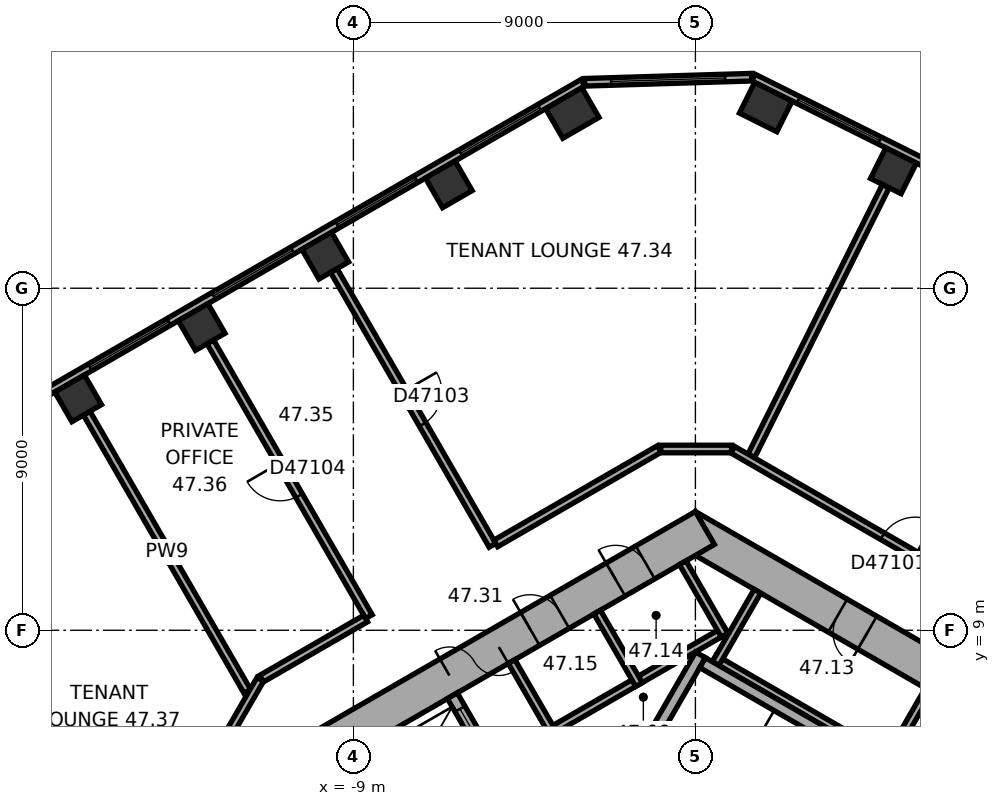
"""IFC4 building model, lengths in metres.
Left out: names, types, materials, properties, quantities, classifications, styles, units other than length and angle.
Written with IfcOpenShell. Run it as: python <this file> out.ifc"""

import sys

from ifc_helpers import new_model, si_unit, direction, frame, frame_2d, origin, origin_2d, place, context, subcontext, project, spatial, rectangle, extrude, element, fill, save


model = new_model("IFC4")
c1 = context("Model", 3, precision=1e-05, world=origin(), true_north=direction((0.0, 1.0)))
c2 = subcontext(c1, "Body", "Model", "MODEL_VIEW")
j1 = project(units=[si_unit("LENGTHUNIT", "METRE"), si_unit("PLANEANGLEUNIT", "RADIAN")], contexts=[c1])
p1 = place(None, origin())
s1 = spatial("IfcSite", under=j1, at=p1, CompositionType="ELEMENT")
p2 = place(p1, origin())
s2 = spatial("IfcBuilding", under=s1, at=p2, CompositionType="ELEMENT")
p3 = place(p2, frame((0.0, 0.0, 191.0)))
s3 = spatial("IfcBuildingStorey", under=s2, at=p3, CompositionType="ELEMENT", Elevation=191.0)
p4 = place(p3, frame((5.211, 21.091, 0.0), z_axis=(0.0, 0.0, 1.0), x_axis=(-0.894934361602, 0.44619781311, 0.0)))
e1 = element("IfcColumn", 1, at=p4, inside=s3, PredefinedType="COLUMN", context=c2, shape_type="SweptSolid", body=[
    extrude(rectangle(XDim=0.9, YDim=0.9, at=origin_2d()), origin(), (0.0, 0.0, 1.0), 3.7),
])
for number, where, z_axis, x_axis in (
    (2, (1.852, 22.766, 0.0), (0.0, 0.0, 1.0), (-0.895, 0.446, 0.0)),
    (3, (-3.238, 22.61, 0.0), (0.0, 0.0, 1.0), (-0.866, -0.5, 0.0)),
):
    element("IfcColumn", number, at=place(p3, frame(where, z_axis=z_axis, x_axis=x_axis)), inside=s3, PredefinedType="COLUMN", context=c2, shape_type="SweptSolid", body=[
        extrude(rectangle(XDim=1.1, YDim=0.9, at=origin_2d()), origin(), (0.0, 0.0, 1.0), 3.7),
    ])
for number, where, z_axis, x_axis in (
    (4, (-6.489, 20.733, 0.0), (0.0, 0.0, 1.0), (-0.866, -0.5, 0.0)),
    (5, (-9.74, 18.856, 0.0), (0.0, 0.0, 1.0), (-0.866, -0.5, 0.0)),
    (6, (-12.991, 16.979, 0.0), (0.0, 0.0, 1.0), (-0.866, -0.5, 0.0)),
    (7, (-16.242, 15.102, 0.0), (0.0, 0.0, 1.0), (-0.866, -0.5, 0.0)),
):
    element("IfcColumn", number, at=place(p3, frame(where, z_axis=z_axis, x_axis=x_axis)), inside=s3, PredefinedType="COLUMN", context=c2, shape_type="SweptSolid", body=[
        extrude(rectangle(XDim=0.9, YDim=0.9, at=origin_2d()), origin(), (0.0, 0.0, 1.0), 3.7),
    ])
p5 = place(p3, frame((10.25, 5.629, 0.0), z_axis=(0.0, 0.0, 1.0), x_axis=(-0.866022616891, 0.50000482701, 0.0)))
e8 = element("IfcWall", 8, at=p5, inside=s3, PredefinedType="SHEAR", context=c2, shape_type="SweptSolid", body=[
    extrude(rectangle(XDim=12.125, YDim=1.0, at=frame_2d((6.062, 0.0))), origin(), (0.0, 0.0, 1.0), 3.7),
])
p6 = place(p5, frame((2.712, 0.0, 0.0)))
e9 = element("IfcOpeningElement", 9, at=p6, cuts=e8, PredefinedType="OPENING", context=c2, shape_type="SweptSolid", body=[
    extrude(rectangle(XDim=0.9, YDim=2.1, at=frame_2d((0.45, 1.05))), frame((0.0, 0.51, 0.0), z_axis=(0.0, -1.0, 0.0), x_axis=(1.0, 0.0, 0.0)), (0.0, 0.0, 1.0), 1.02),
])
p7 = place(p5, frame((6.612, 0.0, 0.0)))
e10 = element("IfcOpeningElement", 10, at=p7, cuts=e8, PredefinedType="OPENING", context=c2, shape_type="SweptSolid", body=[
    extrude(rectangle(XDim=0.9, YDim=2.1, at=frame_2d((0.45, 1.05))), frame((0.0, 0.51, 0.0), z_axis=(0.0, -1.0, 0.0), x_axis=(1.0, 0.0, 0.0)), (0.0, 0.0, 1.0), 1.02),
])
p8 = place(p3, frame((0.25, 11.691, 0.0), z_axis=(0.0, 0.0, 1.0), x_axis=(-0.866022616891, -0.50000482701, 0.0)))
e11 = element("IfcWall", 11, at=p8, inside=s3, PredefinedType="SHEAR", context=c2, shape_type="SweptSolid", body=[
    extrude(rectangle(XDim=12.125, YDim=1.0, at=frame_2d((6.062, 0.0))), origin(), (0.0, 0.0, 1.0), 3.7),
])
p9 = place(p8, frame((6.262, 0.0, 0.0)))
e12 = element("IfcOpeningElement", 12, at=p9, cuts=e11, PredefinedType="OPENING", context=c2, shape_type="SweptSolid", body=[
    extrude(rectangle(XDim=1.5, YDim=2.1, at=frame_2d((0.75, 1.05))), frame((0.0, 0.51, 0.0), z_axis=(0.0, -1.0, 0.0), x_axis=(1.0, 0.0, 0.0)), (0.0, 0.0, 1.0), 1.02),
])
p10 = place(p8, frame((1.812, 0.0, 0.0)))
e13 = element("IfcOpeningElement", 13, at=p10, cuts=e11, PredefinedType="OPENING", context=c2, shape_type="SweptSolid", body=[
    extrude(rectangle(XDim=0.9, YDim=2.1, at=frame_2d((0.45, 1.05))), frame((0.0, 0.51, 0.0), z_axis=(0.0, -1.0, 0.0), x_axis=(1.0, 0.0, 0.0)), (0.0, 0.0, 1.0), 1.02),
])
p11 = place(p8, frame((4.412, 0.0, 0.0)))
e14 = element("IfcOpeningElement", 14, at=p11, cuts=e11, PredefinedType="OPENING", context=c2, shape_type="SweptSolid", body=[
    extrude(rectangle(XDim=0.9, YDim=2.1, at=frame_2d((0.45, 1.05))), frame((0.0, 0.51, 0.0), z_axis=(0.0, -1.0, 0.0), x_axis=(1.0, 0.0, 0.0)), (0.0, 0.0, 1.0), 1.02),
])
p12 = place(p3, frame((19.464, 14.599, 0.0), z_axis=(0.0, 0.0, 1.0), x_axis=(-0.894935755043, 0.446195018289, 0.0)))
e15 = element("IfcWall", 15, at=p12, inside=s3, PredefinedType="STANDARD", context=c2, shape_type="SweptSolid", body=[
    extrude(rectangle(XDim=20.044, YDim=0.2, at=frame_2d((10.022, 0.0))), origin(), (0.0, 0.0, 1.0), 3.7),
])
p13 = place(p12, frame((1.313, 0.0, 0.9)))
e16 = element("IfcOpeningElement", 16, at=p13, cuts=e15, PredefinedType="OPENING", context=c2, shape_type="SweptSolid", body=[
    extrude(rectangle(XDim=2.4, YDim=2.0, at=frame_2d((1.2, 1.0))), frame((0.0, 0.11, 0.0), z_axis=(0.0, -1.0, 0.0), x_axis=(1.0, 0.0, 0.0)), (0.0, 0.0, 1.0), 0.22),
])
p14 = place(p12, frame((5.067, 0.0, 0.9)))
e17 = element("IfcOpeningElement", 17, at=p14, cuts=e15, PredefinedType="OPENING", context=c2, shape_type="SweptSolid", body=[
    extrude(rectangle(XDim=2.4, YDim=2.0, at=frame_2d((1.2, 1.0))), frame((0.0, 0.11, 0.0), z_axis=(0.0, -1.0, 0.0), x_axis=(1.0, 0.0, 0.0)), (0.0, 0.0, 1.0), 0.22),
])
p15 = place(p12, frame((8.821, 0.0, 0.9)))
e18 = element("IfcOpeningElement", 18, at=p15, cuts=e15, PredefinedType="OPENING", context=c2, shape_type="SweptSolid", body=[
    extrude(rectangle(XDim=2.4, YDim=2.0, at=frame_2d((1.2, 1.0))), frame((0.0, 0.11, 0.0), z_axis=(0.0, -1.0, 0.0), x_axis=(1.0, 0.0, 0.0)), (0.0, 0.0, 1.0), 0.22),
])
p16 = place(p12, frame((12.575, 0.0, 0.9)))
e19 = element("IfcOpeningElement", 19, at=p16, cuts=e15, PredefinedType="OPENING", context=c2, shape_type="SweptSolid", body=[
    extrude(rectangle(XDim=2.4, YDim=2.0, at=frame_2d((1.2, 1.0))), frame((0.0, 0.11, 0.0), z_axis=(0.0, -1.0, 0.0), x_axis=(1.0, 0.0, 0.0)), (0.0, 0.0, 1.0), 0.22),
])
p17 = place(p12, frame((16.329, 0.0, 0.9)))
e20 = element("IfcOpeningElement", 20, at=p17, cuts=e15, PredefinedType="OPENING", context=c2, shape_type="SweptSolid", body=[
    extrude(rectangle(XDim=2.4, YDim=2.0, at=frame_2d((1.2, 1.0))), frame((0.0, 0.11, 0.0), z_axis=(0.0, -1.0, 0.0), x_axis=(1.0, 0.0, 0.0)), (0.0, 0.0, 1.0), 0.22),
])
p18 = place(p3, frame((1.479, 23.553, 0.0), z_axis=(0.0, 0.0, 1.0), x_axis=(-0.999534786117, -0.03049936625, 0.0)))
e21 = element("IfcWall", 21, at=p18, inside=s3, PredefinedType="STANDARD", context=c2, shape_type="SweptSolid", body=[
    extrude(rectangle(XDim=4.395, YDim=0.2, at=frame_2d((2.197, 0.0))), origin(), (0.0, 0.0, 1.0), 3.7),
])
p19 = place(p18, frame((0.698, 0.0, 0.9)))
e22 = element("IfcOpeningElement", 22, at=p19, cuts=e21, PredefinedType="OPENING", context=c2, shape_type="SweptSolid", body=[
    extrude(rectangle(XDim=3.0, YDim=2.0, at=frame_2d((1.5, 1.0))), frame((0.0, 0.11, 0.0), z_axis=(0.0, -1.0, 0.0), x_axis=(1.0, 0.0, 0.0)), (0.0, 0.0, 1.0), 0.22),
])
p20 = place(p3, frame((-2.961, 23.405, 0.0), z_axis=(0.0, 0.0, 1.0), x_axis=(-0.866023315909, -0.500003616288, 0.0)))
e23 = element("IfcWall", 23, at=p20, inside=s3, PredefinedType="STANDARD", context=c2, shape_type="SweptSolid", body=[
    extrude(rectangle(XDim=20.044, YDim=0.2, at=frame_2d((10.022, 0.0))), origin(), (0.0, 0.0, 1.0), 3.7),
])
p21 = place(p20, frame((1.314, 0.0, 0.9)))
e24 = element("IfcOpeningElement", 24, at=p21, cuts=e23, PredefinedType="OPENING", context=c2, shape_type="SweptSolid", body=[
    extrude(rectangle(XDim=2.4, YDim=2.0, at=frame_2d((1.2, 1.0))), frame((0.0, 0.11, 0.0), z_axis=(0.0, -1.0, 0.0), x_axis=(1.0, 0.0, 0.0)), (0.0, 0.0, 1.0), 0.22),
])
p22 = place(p20, frame((5.069, 0.0, 0.9)))
e25 = element("IfcOpeningElement", 25, at=p22, cuts=e23, PredefinedType="OPENING", context=c2, shape_type="SweptSolid", body=[
    extrude(rectangle(XDim=2.4, YDim=2.0, at=frame_2d((1.2, 1.0))), frame((0.0, 0.11, 0.0), z_axis=(0.0, -1.0, 0.0), x_axis=(1.0, 0.0, 0.0)), (0.0, 0.0, 1.0), 0.22),
])
p23 = place(p20, frame((8.823, 0.0, 0.9)))
e26 = element("IfcOpeningElement", 26, at=p23, cuts=e23, PredefinedType="OPENING", context=c2, shape_type="SweptSolid", body=[
    extrude(rectangle(XDim=2.4, YDim=2.0, at=frame_2d((1.2, 1.0))), frame((0.0, 0.11, 0.0), z_axis=(0.0, -1.0, 0.0), x_axis=(1.0, 0.0, 0.0)), (0.0, 0.0, 1.0), 0.22),
])
p24 = place(p20, frame((12.577, 0.0, 0.9)))
e27 = element("IfcOpeningElement", 27, at=p24, cuts=e23, PredefinedType="OPENING", context=c2, shape_type="SweptSolid", body=[
    extrude(rectangle(XDim=2.4, YDim=2.0, at=frame_2d((1.2, 1.0))), frame((0.0, 0.11, 0.0), z_axis=(0.0, -1.0, 0.0), x_axis=(1.0, 0.0, 0.0)), (0.0, 0.0, 1.0), 0.22),
])
p25 = place(p20, frame((16.331, 0.0, 0.9)))
e28 = element("IfcOpeningElement", 28, at=p25, cuts=e23, PredefinedType="OPENING", context=c2, shape_type="SweptSolid", body=[
    extrude(rectangle(XDim=2.4, YDim=2.0, at=frame_2d((1.2, 1.0))), frame((0.0, 0.11, 0.0), z_axis=(0.0, -1.0, 0.0), x_axis=(1.0, 0.0, 0.0)), (0.0, 0.0, 1.0), 0.22),
])
p26 = place(p3, frame((7.424, 4.259, 0.0), z_axis=(0.0, 0.0, 1.0), x_axis=(-0.866026010844, 0.49999894854, 0.0)))
e29 = element("IfcWall", 29, at=p26, inside=s3, PredefinedType="PARTITIONING", context=c2, shape_type="SweptSolid", body=[
    extrude(rectangle(XDim=8.0, YDim=0.2, at=frame_2d((4.0, 0.0))), origin(), (0.0, 0.0, 1.0), 3.42),
])
for number, where, z_axis, x_axis in (
    (30, (5.036, 5.522, 0.0), (0.0, 0.0, 1.0), (0.5, 0.866, 0.0)),
    (31, (0.532, 8.122, 0.0), (0.0, 0.0, 1.0), (0.5, 0.866, 0.0)),
):
    element("IfcWall", number, at=place(p3, frame(where, z_axis=z_axis, x_axis=x_axis)), inside=s3, PredefinedType="PARTITIONING", context=c2, shape_type="SweptSolid", body=[
        extrude(rectangle(XDim=2.2, YDim=0.2, at=frame_2d((1.1, 0.0))), origin(), (0.0, 0.0, 1.0), 3.42),
    ])
p27 = place(p3, frame((0.803, 9.009, 0.0), z_axis=(0.0, 0.0, 1.0), x_axis=(-0.866028230842, -0.499995103361, 0.0)))
e32 = element("IfcWall", 32, at=p27, inside=s3, PredefinedType="PARTITIONING", context=c2, shape_type="SweptSolid", body=[
    extrude(rectangle(XDim=5.4, YDim=0.2, at=frame_2d((2.7, 0.0))), origin(), (0.0, 0.0, 1.0), 3.42),
])
p28 = place(p3, frame((0.767, 8.872, 0.0), z_axis=(0.0, 0.0, 1.0), x_axis=(-0.499994660107, 0.866028486751, 0.0)))
e33 = element("IfcWall", 33, at=p28, inside=s3, PredefinedType="PARTITIONING", context=c2, shape_type="SweptSolid", body=[
    extrude(rectangle(XDim=2.2, YDim=0.2, at=frame_2d((1.1, 0.0))), origin(), (0.0, 0.0, 1.0), 3.42),
])
for number, where, z_axis, x_axis in (
    (34, (-1.485, 7.572, 0.0), (0.0, 0.0, 1.0), (-0.5, 0.866, 0.0)),
    (35, (-3.737, 6.272, 0.0), (0.0, 0.0, 1.0), (-0.5, 0.866, 0.0)),
):
    element("IfcWall", number, at=place(p3, frame(where, z_axis=z_axis, x_axis=x_axis)), inside=s3, PredefinedType="PARTITIONING", context=c2, shape_type="SweptSolid", body=[
        extrude(rectangle(XDim=2.2, YDim=0.2, at=frame_2d((1.1, 0.0))), origin(), (0.0, 0.0, 1.0), 3.42),
    ])
p29 = place(p3, frame((-2.216, 4.282, 0.0), z_axis=(0.0, 0.0, 1.0), x_axis=(0.499977259774, 0.866038532462, 0.0)))
e36 = element("IfcWall", 36, at=p29, inside=s3, PredefinedType="SHEAR", context=c2, shape_type="SweptSolid", body=[
    extrude(rectangle(XDim=4.7, YDim=0.3, at=frame_2d((2.35, 0.0))), origin(), (0.0, 0.0, 1.0), 3.42),
])
p30 = place(p3, frame((6.303, 4.617, 0.0), z_axis=(0.0, 0.0, 1.0), x_axis=(-0.866027801685, 0.499995846692, 0.0)))
e37 = element("IfcWall", 37, at=p30, inside=s3, PredefinedType="SHEAR", context=c2, shape_type="SweptSolid", body=[
    extrude(rectangle(XDim=7.06, YDim=0.3, at=frame_2d((3.53, 0.0))), origin(), (0.0, 0.0, 1.0), 3.42),
])
p31 = place(p3, frame((-5.295, 5.372, 0.0), z_axis=(0.0, 0.0, 1.0), x_axis=(-0.500077893725, 0.86598042715, 0.0)))
e38 = element("IfcWall", 38, at=p31, inside=s3, PredefinedType="SHEAR", context=c2, shape_type="SweptSolid", body=[
    extrude(rectangle(XDim=2.2, YDim=0.3, at=frame_2d((1.1, 0.0))), origin(), (0.0, 0.0, 1.0), 3.42),
])
p32 = place(p31, frame((0.7, 0.0, 0.0)))
e39 = element("IfcOpeningElement", 39, at=p32, cuts=e38, PredefinedType="OPENING", context=c2, shape_type="SweptSolid", body=[
    extrude(rectangle(XDim=1.1, YDim=2.1, at=frame_2d((0.55, 1.05))), frame((0.0, 0.16, 0.0), z_axis=(0.0, -1.0, 0.0), x_axis=(1.0, 0.0, 0.0)), (0.0, 0.0, 1.0), 0.32),
])
p33 = place(p3, frame((-16.018, 14.712, 0.0), z_axis=(0.0, 0.0, 1.0), x_axis=(0.500000843414, -0.866024916838, 0.0)))
e40 = element("IfcWall", 40, at=p33, inside=s3, PredefinedType="PARTITIONING", context=c2, shape_type="SweptSolid", body=[
    extrude(rectangle(XDim=8.452, YDim=0.2, at=frame_2d((4.226, 0.0))), origin(), (0.0, 0.0, 1.0), 3.42),
])
p34 = place(p3, frame((-12.766, 16.589, 0.0), z_axis=(0.0, 0.0, 1.0), x_axis=(0.500010139422, -0.866019549707, 0.0)))
e41 = element("IfcWall", 41, at=p34, inside=s3, PredefinedType="PARTITIONING", context=c2, shape_type="SweptSolid", body=[
    extrude(rectangle(XDim=8.35, YDim=0.2, at=frame_2d((4.175, 0.0))), origin(), (0.0, 0.0, 1.0), 3.42),
])
p35 = place(p34, frame((3.675, 0.0, 0.0)))
e42 = element("IfcOpeningElement", 42, at=p35, cuts=e41, PredefinedType="OPENING", context=c2, shape_type="SweptSolid", body=[
    extrude(rectangle(XDim=1.0, YDim=2.1, at=frame_2d((0.5, 1.05))), frame((0.0, 0.11, 0.0), z_axis=(0.0, -1.0, 0.0), x_axis=(1.0, 0.0, 0.0)), (0.0, 0.0, 1.0), 0.22),
])
p36 = place(p3, frame((-11.45, 7.708, 0.0), z_axis=(0.0, 0.0, 1.0), x_axis=(-0.499964847546, -0.866045698112, 0.0)))
e43 = element("IfcWall", 43, at=p36, inside=s3, PredefinedType="PARTITIONING", context=c2, shape_type="SweptSolid", body=[
    extrude(rectangle(XDim=1.86, YDim=0.2, at=frame_2d((0.93, 0.0))), origin(), (0.0, 0.0, 1.0), 3.42),
])
p37 = place(p3, frame((-9.515, 18.466, 0.0), z_axis=(0.0, 0.0, 1.0), x_axis=(0.500010139422, -0.866019549707, 0.0)))
e44 = element("IfcWall", 44, at=p37, inside=s3, PredefinedType="PARTITIONING", context=c2, shape_type="SweptSolid", body=[
    extrude(rectangle(XDim=8.35, YDim=0.2, at=frame_2d((4.175, 0.0))), origin(), (0.0, 0.0, 1.0), 2.87),
])
p38 = place(p37, frame((3.675, 0.0, 0.0)))
e45 = element("IfcOpeningElement", 45, at=p38, cuts=e44, PredefinedType="OPENING", context=c2, shape_type="SweptSolid", body=[
    extrude(rectangle(XDim=1.0, YDim=2.1, at=frame_2d((0.5, 1.05))), frame((0.0, 0.11, 0.0), z_axis=(0.0, -1.0, 0.0), x_axis=(1.0, 0.0, 0.0)), (0.0, 0.0, 1.0), 0.22),
])
p39 = place(p3, frame((-8.678, 9.308, 0.0), z_axis=(0.0, 0.0, 1.0), x_axis=(-0.866000359435, -0.500043375578, 0.0)))
e46 = element("IfcWall", 46, at=p39, inside=s3, PredefinedType="PARTITIONING", context=c2, shape_type="SweptSolid", body=[
    extrude(rectangle(XDim=3.161, YDim=0.2, at=frame_2d((1.581, 0.0))), origin(), (0.0, 0.0, 1.0), 3.42),
])
p40 = place(p3, frame((-0.95, 13.77, 0.0), z_axis=(0.0, 0.0, 1.0), x_axis=(-0.866036689987, -0.499980451214, 0.0)))
e47 = element("IfcWall", 47, at=p40, inside=s3, PredefinedType="PARTITIONING", context=c2, shape_type="SweptSolid", body=[
    extrude(rectangle(XDim=4.969, YDim=0.2, at=frame_2d((2.485, 0.0))), origin(), (0.0, 0.0, 1.0), 3.42),
])
p41 = place(p3, frame((0.95, 13.77, 0.0), z_axis=(0.0, 0.0, 1.0), x_axis=(-1.0, 0.0, 0.0)))
e48 = element("IfcWall", 48, at=p41, inside=s3, PredefinedType="PARTITIONING", context=c2, shape_type="SweptSolid", body=[
    extrude(rectangle(XDim=1.86, YDim=0.2, at=frame_2d((0.93, 0.0))), origin(), (0.0, 0.0, 1.0), 3.42),
])
p42 = place(p3, frame((5.01, 20.688, 0.0), z_axis=(0.0, 0.0, 1.0), x_axis=(-0.446203062394, -0.894931744386, 0.0)))
e49 = element("IfcWall", 49, at=p42, inside=s3, PredefinedType="PARTITIONING", context=c2, shape_type="SweptSolid", body=[
    extrude(rectangle(XDim=7.927, YDim=0.2, at=frame_2d((3.963, 0.0))), origin(), (0.0, 0.0, 1.0), 2.87),
])
p43 = place(p3, frame((11.233, 7.833, 0.0), z_axis=(0.0, 0.0, 1.0), x_axis=(-0.866021713988, 0.50000639086, 0.0)))
e50 = element("IfcWall", 50, at=p43, inside=s3, PredefinedType="PARTITIONING", context=c2, shape_type="SweptSolid", body=[
    extrude(rectangle(XDim=11.834, YDim=0.2, at=frame_2d((5.917, 0.0))), origin(), (0.0, 0.0, 1.0), 3.42),
])
p44 = place(p43, frame((6.288, 0.0, 0.0)))
e51 = element("IfcOpeningElement", 51, at=p44, cuts=e50, PredefinedType="OPENING", context=c2, shape_type="SweptSolid", body=[
    extrude(rectangle(XDim=1.0, YDim=2.1, at=frame_2d((0.5, 1.05))), frame((0.0, 0.11, 0.0), z_axis=(0.0, -1.0, 0.0), x_axis=(1.0, 0.0, 0.0)), (0.0, 0.0, 1.0), 0.22),
])
p45 = place(p17, origin())
e52 = element("IfcWindow", 52, at=p45, inside=s3, PartitioningType="SINGLE_PANEL", PredefinedType="WINDOW", context=c2, shape_type="SweptSolid", body=[
    extrude(rectangle(XDim=2.4, YDim=2.0, at=frame_2d((1.2, 1.0))), frame((0.0, 0.03, 0.0), z_axis=(0.0, -1.0, 0.0), x_axis=(1.0, 0.0, 0.0)), (0.0, 0.0, 1.0), 0.06),
])
fill(e20, e52)
p46 = place(p19, origin())
e53 = element("IfcWindow", 53, at=p46, inside=s3, PartitioningType="SINGLE_PANEL", PredefinedType="WINDOW", context=c2, shape_type="SweptSolid", body=[
    extrude(rectangle(XDim=3.0, YDim=2.0, at=frame_2d((1.5, 1.0))), frame((0.0, 0.03, 0.0), z_axis=(0.0, -1.0, 0.0), x_axis=(1.0, 0.0, 0.0)), (0.0, 0.0, 1.0), 0.06),
])
fill(e22, e53)
p47 = place(p21, origin())
e54 = element("IfcWindow", 54, at=p47, inside=s3, PartitioningType="SINGLE_PANEL", PredefinedType="WINDOW", context=c2, shape_type="SweptSolid", body=[
    extrude(rectangle(XDim=2.4, YDim=2.0, at=frame_2d((1.2, 1.0))), frame((0.0, 0.03, 0.0), z_axis=(0.0, -1.0, 0.0), x_axis=(1.0, 0.0, 0.0)), (0.0, 0.0, 1.0), 0.06),
])
fill(e24, e54)
p48 = place(p22, origin())
e55 = element("IfcWindow", 55, at=p48, inside=s3, PartitioningType="SINGLE_PANEL", PredefinedType="WINDOW", context=c2, shape_type="SweptSolid", body=[
    extrude(rectangle(XDim=2.4, YDim=2.0, at=frame_2d((1.2, 1.0))), frame((0.0, 0.03, 0.0), z_axis=(0.0, -1.0, 0.0), x_axis=(1.0, 0.0, 0.0)), (0.0, 0.0, 1.0), 0.06),
])
fill(e25, e55)
p49 = place(p23, origin())
e56 = element("IfcWindow", 56, at=p49, inside=s3, PartitioningType="SINGLE_PANEL", PredefinedType="WINDOW", context=c2, shape_type="SweptSolid", body=[
    extrude(rectangle(XDim=2.4, YDim=2.0, at=frame_2d((1.2, 1.0))), frame((0.0, 0.03, 0.0), z_axis=(0.0, -1.0, 0.0), x_axis=(1.0, 0.0, 0.0)), (0.0, 0.0, 1.0), 0.06),
])
fill(e26, e56)
p50 = place(p24, origin())
e57 = element("IfcWindow", 57, at=p50, inside=s3, PartitioningType="SINGLE_PANEL", PredefinedType="WINDOW", context=c2, shape_type="SweptSolid", body=[
    extrude(rectangle(XDim=2.4, YDim=2.0, at=frame_2d((1.2, 1.0))), frame((0.0, 0.03, 0.0), z_axis=(0.0, -1.0, 0.0), x_axis=(1.0, 0.0, 0.0)), (0.0, 0.0, 1.0), 0.06),
])
fill(e27, e57)
p51 = place(p9, origin())
e58 = element("IfcDoor", 58, at=p51, inside=s3, OperationType="DOUBLE_DOOR_SINGLE_SWING", PredefinedType="DOOR", context=c2, shape_type="SweptSolid", body=[
    extrude(rectangle(XDim=1.5, YDim=2.1, at=frame_2d((0.75, 1.05))), frame((0.0, 0.025, 0.0), z_axis=(0.0, -1.0, 0.0), x_axis=(1.0, 0.0, 0.0)), (0.0, 0.0, 1.0), 0.05),
])
fill(e12, e58)
p52 = place(p7, origin())
e59 = element("IfcDoor", 59, at=p52, inside=s3, OperationType="SINGLE_SWING_LEFT", PredefinedType="DOOR", context=c2, shape_type="SweptSolid", body=[
    extrude(rectangle(XDim=0.9, YDim=2.1, at=frame_2d((0.45, 1.05))), frame((0.0, 0.025, 0.0), z_axis=(0.0, -1.0, 0.0), x_axis=(1.0, 0.0, 0.0)), (0.0, 0.0, 1.0), 0.05),
])
fill(e10, e59)
p53 = place(p10, origin())
e60 = element("IfcDoor", 60, at=p53, inside=s3, OperationType="SINGLE_SWING_LEFT", PredefinedType="DOOR", context=c2, shape_type="SweptSolid", body=[
    extrude(rectangle(XDim=0.9, YDim=2.1, at=frame_2d((0.45, 1.05))), frame((0.0, 0.025, 0.0), z_axis=(0.0, -1.0, 0.0), x_axis=(1.0, 0.0, 0.0)), (0.0, 0.0, 1.0), 0.05),
])
fill(e13, e60)
p54 = place(p11, origin())
e61 = element("IfcDoor", 61, at=p54, inside=s3, OperationType="SINGLE_SWING_LEFT", PredefinedType="DOOR", context=c2, shape_type="SweptSolid", body=[
    extrude(rectangle(XDim=0.9, YDim=2.1, at=frame_2d((0.45, 1.05))), frame((0.0, 0.025, 0.0), z_axis=(0.0, -1.0, 0.0), x_axis=(1.0, 0.0, 0.0)), (0.0, 0.0, 1.0), 0.05),
])
fill(e14, e61)
p55 = place(p32, origin())
e62 = element("IfcDoor", 62, at=p55, inside=s3, OperationType="DOUBLE_DOOR_SLIDING", PredefinedType="DOOR", context=c2, shape_type="SweptSolid", body=[
    extrude(rectangle(XDim=1.1, YDim=2.1, at=frame_2d((0.55, 1.05))), frame((0.0, 0.025, 0.0), z_axis=(0.0, -1.0, 0.0), x_axis=(1.0, 0.0, 0.0)), (0.0, 0.0, 1.0), 0.05),
])
fill(e39, e62)
p56 = place(p44, origin())
e63 = element("IfcDoor", 63, at=p56, inside=s3, OperationType="SINGLE_SWING_LEFT", PredefinedType="DOOR", context=c2, shape_type="SweptSolid", body=[
    extrude(rectangle(XDim=1.0, YDim=2.1, at=frame_2d((0.5, 1.05))), frame((0.0, 0.025, 0.0), z_axis=(0.0, -1.0, 0.0), x_axis=(1.0, 0.0, 0.0)), (0.0, 0.0, 1.0), 0.05),
])
fill(e51, e63)
p57 = place(p38, origin())
e64 = element("IfcDoor", 64, at=p57, inside=s3, OperationType="SINGLE_SWING_LEFT", PredefinedType="DOOR", context=c2, shape_type="SweptSolid", body=[
    extrude(rectangle(XDim=1.0, YDim=2.1, at=frame_2d((0.5, 1.05))), frame((0.0, 0.025, 0.0), z_axis=(0.0, -1.0, 0.0), x_axis=(1.0, 0.0, 0.0)), (0.0, 0.0, 1.0), 0.05),
])
fill(e45, e64)
p58 = place(p35, origin())
e65 = element("IfcDoor", 65, at=p58, inside=s3, OperationType="SINGLE_SWING_LEFT", PredefinedType="DOOR", context=c2, shape_type="SweptSolid", body=[
    extrude(rectangle(XDim=1.0, YDim=2.1, at=frame_2d((0.5, 1.05))), frame((0.0, 0.025, 0.0), z_axis=(0.0, -1.0, 0.0), x_axis=(1.0, 0.0, 0.0)), (0.0, 0.0, 1.0), 0.05),
])
fill(e42, e65)
save(model, sys.argv[1])
